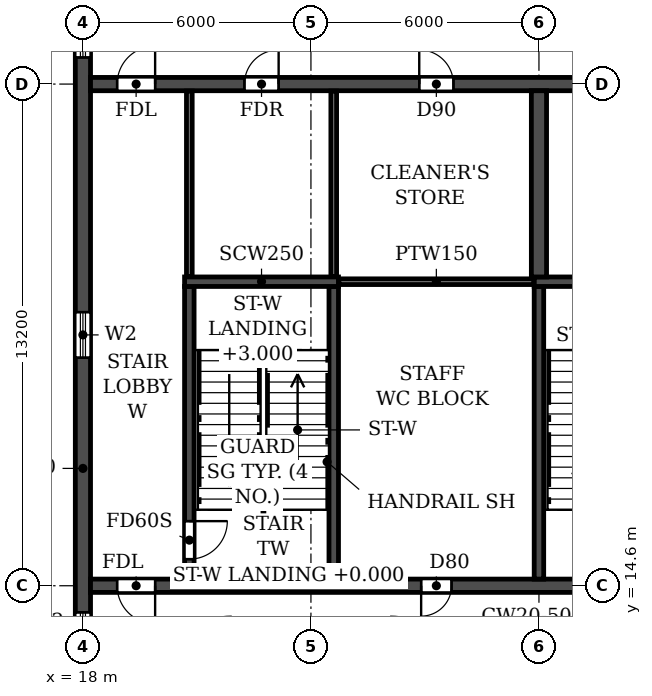
"""IFC4 building model, lengths in metres.
Left out: names, types, materials, properties, quantities, classifications, styles, units other than length and angle.
Written with IfcOpenShell. Run it as: python <this file> out.ifc"""

import sys

from ifc_helpers import new_model, si_unit, direction, frame, frame_2d, origin, place, context, subcontext, project, spatial, rectangle, extrude, element, fill, save


model = new_model("IFC4")
c1 = context("Model", 3, precision=1e-05, world=origin(), true_north=direction((0.0, 1.0)))
c2 = subcontext(c1, "Body", "Model", "MODEL_VIEW")
j1 = project(units=[si_unit("LENGTHUNIT", "METRE"), si_unit("PLANEANGLEUNIT", "RADIAN")], contexts=[c1])
p1 = place(None, origin())
s1 = spatial("IfcSite", under=j1, at=p1, CompositionType="ELEMENT")
p2 = place(p1, origin())
s2 = spatial("IfcBuilding", under=s1, at=p2, CompositionType="ELEMENT")
p3 = place(p2, frame((0.0, 0.0, 261.0)))
s3 = spatial("IfcBuildingStorey", under=s2, at=p3, CompositionType="ELEMENT", Elevation=261.0)
p4 = place(p3, frame((18.0, 4.683, 0.0), z_axis=(0.0, 0.0, 1.0), x_axis=(0.0, 1.0, 0.0)))
e1 = element("IfcWall", 1, at=p4, inside=s3, PredefinedType="SHEAR", context=c2, shape_type="SweptSolid", body=[
    extrude(rectangle(XDim=31.834, YDim=0.4, at=frame_2d((15.917, 0.0))), origin(), (0.0, 0.0, 1.0), 5.7),
])
p5 = place(p4, frame((23.817, 0.0, 0.9)))
e2 = element("IfcOpeningElement", 2, at=p5, cuts=e1, PredefinedType="OPENING", context=c2, shape_type="SweptSolid", body=[
    extrude(rectangle(XDim=1.2, YDim=1.5, at=frame_2d((0.6, 0.75))), frame((0.0, 0.21, 0.0), z_axis=(0.0, -1.0, 0.0), x_axis=(1.0, 0.0, 0.0)), (0.0, 0.0, 1.0), 0.42),
])
p6 = place(p4, frame((8.017, 0.0, 0.9)))
e3 = element("IfcOpeningElement", 3, at=p6, cuts=e1, PredefinedType="OPENING", context=c2, shape_type="SweptSolid", body=[
    extrude(rectangle(XDim=1.2, YDim=1.5, at=frame_2d((0.6, 0.75))), frame((0.0, 0.21, 0.0), z_axis=(0.0, -1.0, 0.0), x_axis=(1.0, 0.0, 0.0)), (0.0, 0.0, 1.0), 0.42),
])
p7 = place(p4, frame((27.694, 0.0, 0.6)))
e4 = element("IfcOpeningElement", 4, at=p7, cuts=e1, PredefinedType="OPENING", context=c2, shape_type="SweptSolid", body=[
    extrude(rectangle(XDim=2.2, YDim=1.8, at=frame_2d((1.1, 0.9))), frame((0.0, 0.21, 0.0), z_axis=(0.0, -1.0, 0.0), x_axis=(1.0, 0.0, 0.0)), (0.0, 0.0, 1.0), 0.42),
])
p8 = place(p4, frame((2.541, 0.0, 0.6)))
e5 = element("IfcOpeningElement", 5, at=p8, cuts=e1, PredefinedType="OPENING", context=c2, shape_type="SweptSolid", body=[
    extrude(rectangle(XDim=2.2, YDim=1.8, at=frame_2d((1.1, 0.9))), frame((0.0, 0.21, 0.0), z_axis=(0.0, -1.0, 0.0), x_axis=(1.0, 0.0, 0.0)), (0.0, 0.0, 1.0), 0.42),
])
p9 = place(p4, frame((15.917, 0.0, 0.9)))
e6 = element("IfcOpeningElement", 6, at=p9, cuts=e1, PredefinedType="OPENING", context=c2, shape_type="SweptSolid", body=[
    extrude(rectangle(XDim=1.2, YDim=1.5, at=frame_2d((0.6, 0.75))), frame((0.0, 0.21, 0.0), z_axis=(0.0, -1.0, 0.0), x_axis=(1.0, 0.0, 0.0)), (0.0, 0.0, 1.0), 0.42),
])
p10 = place(p3, frame((18.2, 14.6, 0.0), z_axis=(0.0, 0.0, 1.0), x_axis=(1.0, 0.0, 0.0)))
e7 = element("IfcWall", 7, at=p10, inside=s3, PredefinedType="SOLIDWALL", context=c2, shape_type="SweptSolid", body=[
    extrude(rectangle(XDim=65.6, YDim=0.35, at=frame_2d((32.8, 0.0))), origin(), (0.0, 0.0, 1.0), 5.7),
])
p11 = place(p10, frame((0.7, 0.0, 0.0)))
e8 = element("IfcOpeningElement", 8, at=p11, cuts=e7, PredefinedType="OPENING", context=c2, shape_type="SweptSolid", body=[
    extrude(rectangle(XDim=1.0, YDim=2.1, at=frame_2d((0.5, 1.05))), frame((0.0, 0.185, 0.0), z_axis=(0.0, -1.0, 0.0), x_axis=(1.0, 0.0, 0.0)), (0.0, 0.0, 1.0), 0.37),
])
p12 = place(p10, frame((8.7, 0.0, 0.0)))
e9 = element("IfcOpeningElement", 9, at=p12, cuts=e7, PredefinedType="OPENING", context=c2, shape_type="SweptSolid", body=[
    extrude(rectangle(XDim=0.8, YDim=2.1, at=frame_2d((0.4, 1.05))), frame((0.0, 0.185, 0.0), z_axis=(0.0, -1.0, 0.0), x_axis=(1.0, 0.0, 0.0)), (0.0, 0.0, 1.0), 0.37),
])
p13 = place(p10, frame((13.2, 0.0, 0.0)))
e10 = element("IfcOpeningElement", 10, at=p13, cuts=e7, PredefinedType="OPENING", context=c2, shape_type="SweptSolid", body=[
    extrude(rectangle(XDim=1.0, YDim=2.1, at=frame_2d((0.5, 1.05))), frame((0.0, 0.185, 0.0), z_axis=(0.0, -1.0, 0.0), x_axis=(1.0, 0.0, 0.0)), (0.0, 0.0, 1.0), 0.37),
])
p14 = place(p10, frame((25.55, 0.0, 0.0)))
e11 = element("IfcOpeningElement", 11, at=p14, cuts=e7, PredefinedType="OPENING", context=c2, shape_type="SweptSolid", body=[
    extrude(rectangle(XDim=1.5, YDim=2.1, at=frame_2d((0.75, 1.05))), frame((0.0, 0.185, 0.0), z_axis=(0.0, -1.0, 0.0), x_axis=(1.0, 0.0, 0.0)), (0.0, 0.0, 1.0), 0.37),
])
p15 = place(p10, frame((29.7, 0.0, 0.0)))
e12 = element("IfcOpeningElement", 12, at=p15, cuts=e7, PredefinedType="OPENING", context=c2, shape_type="SweptSolid", body=[
    extrude(rectangle(XDim=1.0, YDim=2.1, at=frame_2d((0.5, 1.05))), frame((0.0, 0.185, 0.0), z_axis=(0.0, -1.0, 0.0), x_axis=(1.0, 0.0, 0.0)), (0.0, 0.0, 1.0), 0.37),
])
p16 = place(p10, frame((32.3, 0.0, 0.0)))
e13 = element("IfcOpeningElement", 13, at=p16, cuts=e7, PredefinedType="OPENING", context=c2, shape_type="SweptSolid", body=[
    extrude(rectangle(XDim=1.0, YDim=2.1, at=frame_2d((0.5, 1.05))), frame((0.0, 0.185, 0.0), z_axis=(0.0, -1.0, 0.0), x_axis=(1.0, 0.0, 0.0)), (0.0, 0.0, 1.0), 0.37),
])
p17 = place(p10, frame((34.9, 0.0, 0.0)))
e14 = element("IfcOpeningElement", 14, at=p17, cuts=e7, PredefinedType="OPENING", context=c2, shape_type="SweptSolid", body=[
    extrude(rectangle(XDim=1.0, YDim=2.1, at=frame_2d((0.5, 1.05))), frame((0.0, 0.185, 0.0), z_axis=(0.0, -1.0, 0.0), x_axis=(1.0, 0.0, 0.0)), (0.0, 0.0, 1.0), 0.37),
])
p18 = place(p10, frame((38.55, 0.0, 0.0)))
e15 = element("IfcOpeningElement", 15, at=p18, cuts=e7, PredefinedType="OPENING", context=c2, shape_type="SweptSolid", body=[
    extrude(rectangle(XDim=1.5, YDim=2.1, at=frame_2d((0.75, 1.05))), frame((0.0, 0.185, 0.0), z_axis=(0.0, -1.0, 0.0), x_axis=(1.0, 0.0, 0.0)), (0.0, 0.0, 1.0), 0.37),
])
p19 = place(p10, frame((51.4, 0.0, 0.0)))
e16 = element("IfcOpeningElement", 16, at=p19, cuts=e7, PredefinedType="OPENING", context=c2, shape_type="SweptSolid", body=[
    extrude(rectangle(XDim=1.0, YDim=2.1, at=frame_2d((0.5, 1.05))), frame((0.0, 0.185, 0.0), z_axis=(0.0, -1.0, 0.0), x_axis=(1.0, 0.0, 0.0)), (0.0, 0.0, 1.0), 0.37),
])
p20 = place(p10, frame((56.1, 0.0, 0.0)))
e17 = element("IfcOpeningElement", 17, at=p20, cuts=e7, PredefinedType="OPENING", context=c2, shape_type="SweptSolid", body=[
    extrude(rectangle(XDim=0.8, YDim=2.1, at=frame_2d((0.4, 1.05))), frame((0.0, 0.185, 0.0), z_axis=(0.0, -1.0, 0.0), x_axis=(1.0, 0.0, 0.0)), (0.0, 0.0, 1.0), 0.37),
])
p21 = place(p10, frame((63.9, 0.0, 0.0)))
e18 = element("IfcOpeningElement", 18, at=p21, cuts=e7, PredefinedType="OPENING", context=c2, shape_type="SweptSolid", body=[
    extrude(rectangle(XDim=1.0, YDim=2.1, at=frame_2d((0.5, 1.05))), frame((0.0, 0.185, 0.0), z_axis=(0.0, -1.0, 0.0), x_axis=(1.0, 0.0, 0.0)), (0.0, 0.0, 1.0), 0.37),
])
p22 = place(p3, frame((18.2, 27.8, 0.0), z_axis=(0.0, 0.0, 1.0), x_axis=(1.0, 0.0, 0.0)))
e19 = element("IfcWall", 19, at=p22, inside=s3, PredefinedType="SOLIDWALL", context=c2, shape_type="SweptSolid", body=[
    extrude(rectangle(XDim=65.6, YDim=0.35, at=frame_2d((32.8, 0.0))), origin(), (0.0, 0.0, 1.0), 5.7),
])
p23 = place(p22, frame((0.7, 0.0, 0.0)))
e20 = element("IfcOpeningElement", 20, at=p23, cuts=e19, PredefinedType="OPENING", context=c2, shape_type="SweptSolid", body=[
    extrude(rectangle(XDim=1.0, YDim=2.1, at=frame_2d((0.5, 1.05))), frame((0.0, 0.185, 0.0), z_axis=(0.0, -1.0, 0.0), x_axis=(1.0, 0.0, 0.0)), (0.0, 0.0, 1.0), 0.37),
])
p24 = place(p22, frame((4.05, 0.0, 0.0)))
e21 = element("IfcOpeningElement", 21, at=p24, cuts=e19, PredefinedType="OPENING", context=c2, shape_type="SweptSolid", body=[
    extrude(rectangle(XDim=0.9, YDim=2.1, at=frame_2d((0.45, 1.05))), frame((0.0, 0.185, 0.0), z_axis=(0.0, -1.0, 0.0), x_axis=(1.0, 0.0, 0.0)), (0.0, 0.0, 1.0), 0.37),
])
p25 = place(p22, frame((8.65, 0.0, 0.0)))
e22 = element("IfcOpeningElement", 22, at=p25, cuts=e19, PredefinedType="OPENING", context=c2, shape_type="SweptSolid", body=[
    extrude(rectangle(XDim=0.9, YDim=2.1, at=frame_2d((0.45, 1.05))), frame((0.0, 0.185, 0.0), z_axis=(0.0, -1.0, 0.0), x_axis=(1.0, 0.0, 0.0)), (0.0, 0.0, 1.0), 0.37),
])
p26 = place(p22, frame((13.25, 0.0, 0.0)))
e23 = element("IfcOpeningElement", 23, at=p26, cuts=e19, PredefinedType="OPENING", context=c2, shape_type="SweptSolid", body=[
    extrude(rectangle(XDim=0.9, YDim=2.1, at=frame_2d((0.45, 1.05))), frame((0.0, 0.185, 0.0), z_axis=(0.0, -1.0, 0.0), x_axis=(1.0, 0.0, 0.0)), (0.0, 0.0, 1.0), 0.37),
])
p27 = place(p22, frame((16.4, 0.0, 0.0)))
e24 = element("IfcOpeningElement", 24, at=p27, cuts=e19, PredefinedType="OPENING", context=c2, shape_type="SweptSolid", body=[
    extrude(rectangle(XDim=1.0, YDim=2.1, at=frame_2d((0.5, 1.05))), frame((0.0, 0.185, 0.0), z_axis=(0.0, -1.0, 0.0), x_axis=(1.0, 0.0, 0.0)), (0.0, 0.0, 1.0), 0.37),
])
p28 = place(p22, frame((21.6, 0.0, 0.0)))
e25 = element("IfcOpeningElement", 25, at=p28, cuts=e19, PredefinedType="OPENING", context=c2, shape_type="SweptSolid", body=[
    extrude(rectangle(XDim=1.0, YDim=2.1, at=frame_2d((0.5, 1.05))), frame((0.0, 0.185, 0.0), z_axis=(0.0, -1.0, 0.0), x_axis=(1.0, 0.0, 0.0)), (0.0, 0.0, 1.0), 0.37),
])
p29 = place(p22, frame((29.4, 0.0, 0.0)))
e26 = element("IfcOpeningElement", 26, at=p29, cuts=e19, PredefinedType="OPENING", context=c2, shape_type="SweptSolid", body=[
    extrude(rectangle(XDim=1.0, YDim=2.1, at=frame_2d((0.5, 1.05))), frame((0.0, 0.185, 0.0), z_axis=(0.0, -1.0, 0.0), x_axis=(1.0, 0.0, 0.0)), (0.0, 0.0, 1.0), 0.37),
])
p30 = place(p22, frame((32.3, 0.0, 0.0)))
e27 = element("IfcOpeningElement", 27, at=p30, cuts=e19, PredefinedType="OPENING", context=c2, shape_type="SweptSolid", body=[
    extrude(rectangle(XDim=1.0, YDim=2.1, at=frame_2d((0.5, 1.05))), frame((0.0, 0.185, 0.0), z_axis=(0.0, -1.0, 0.0), x_axis=(1.0, 0.0, 0.0)), (0.0, 0.0, 1.0), 0.37),
])
p31 = place(p22, frame((35.2, 0.0, 0.0)))
e28 = element("IfcOpeningElement", 28, at=p31, cuts=e19, PredefinedType="OPENING", context=c2, shape_type="SweptSolid", body=[
    extrude(rectangle(XDim=1.0, YDim=2.1, at=frame_2d((0.5, 1.05))), frame((0.0, 0.185, 0.0), z_axis=(0.0, -1.0, 0.0), x_axis=(1.0, 0.0, 0.0)), (0.0, 0.0, 1.0), 0.37),
])
p32 = place(p22, frame((37.8, 0.0, 0.0)))
e29 = element("IfcOpeningElement", 29, at=p32, cuts=e19, PredefinedType="OPENING", context=c2, shape_type="SweptSolid", body=[
    extrude(rectangle(XDim=1.0, YDim=2.1, at=frame_2d((0.5, 1.05))), frame((0.0, 0.185, 0.0), z_axis=(0.0, -1.0, 0.0), x_axis=(1.0, 0.0, 0.0)), (0.0, 0.0, 1.0), 0.37),
])
p33 = place(p22, frame((41.7, 0.0, 0.0)))
e30 = element("IfcOpeningElement", 30, at=p33, cuts=e19, PredefinedType="OPENING", context=c2, shape_type="SweptSolid", body=[
    extrude(rectangle(XDim=1.0, YDim=2.1, at=frame_2d((0.5, 1.05))), frame((0.0, 0.185, 0.0), z_axis=(0.0, -1.0, 0.0), x_axis=(1.0, 0.0, 0.0)), (0.0, 0.0, 1.0), 0.37),
])
p34 = place(p22, frame((45.6, 0.0, 0.0)))
e31 = element("IfcOpeningElement", 31, at=p34, cuts=e19, PredefinedType="OPENING", context=c2, shape_type="SweptSolid", body=[
    extrude(rectangle(XDim=1.0, YDim=2.1, at=frame_2d((0.5, 1.05))), frame((0.0, 0.185, 0.0), z_axis=(0.0, -1.0, 0.0), x_axis=(1.0, 0.0, 0.0)), (0.0, 0.0, 1.0), 0.37),
])
p35 = place(p22, frame((48.2, 0.0, 0.0)))
e32 = element("IfcOpeningElement", 32, at=p35, cuts=e19, PredefinedType="OPENING", context=c2, shape_type="SweptSolid", body=[
    extrude(rectangle(XDim=1.0, YDim=2.1, at=frame_2d((0.5, 1.05))), frame((0.0, 0.185, 0.0), z_axis=(0.0, -1.0, 0.0), x_axis=(1.0, 0.0, 0.0)), (0.0, 0.0, 1.0), 0.37),
])
p36 = place(p22, frame((51.45, 0.0, 0.0)))
e33 = element("IfcOpeningElement", 33, at=p36, cuts=e19, PredefinedType="OPENING", context=c2, shape_type="SweptSolid", body=[
    extrude(rectangle(XDim=0.9, YDim=2.1, at=frame_2d((0.45, 1.05))), frame((0.0, 0.185, 0.0), z_axis=(0.0, -1.0, 0.0), x_axis=(1.0, 0.0, 0.0)), (0.0, 0.0, 1.0), 0.37),
])
p37 = place(p22, frame((56.05, 0.0, 0.0)))
e34 = element("IfcOpeningElement", 34, at=p37, cuts=e19, PredefinedType="OPENING", context=c2, shape_type="SweptSolid", body=[
    extrude(rectangle(XDim=0.9, YDim=2.1, at=frame_2d((0.45, 1.05))), frame((0.0, 0.185, 0.0), z_axis=(0.0, -1.0, 0.0), x_axis=(1.0, 0.0, 0.0)), (0.0, 0.0, 1.0), 0.37),
])
p38 = place(p22, frame((60.65, 0.0, 0.0)))
e35 = element("IfcOpeningElement", 35, at=p38, cuts=e19, PredefinedType="OPENING", context=c2, shape_type="SweptSolid", body=[
    extrude(rectangle(XDim=0.9, YDim=2.1, at=frame_2d((0.45, 1.05))), frame((0.0, 0.185, 0.0), z_axis=(0.0, -1.0, 0.0), x_axis=(1.0, 0.0, 0.0)), (0.0, 0.0, 1.0), 0.37),
])
p39 = place(p22, frame((63.9, 0.0, 0.0)))
e36 = element("IfcOpeningElement", 36, at=p39, cuts=e19, PredefinedType="OPENING", context=c2, shape_type="SweptSolid", body=[
    extrude(rectangle(XDim=1.0, YDim=2.1, at=frame_2d((0.5, 1.05))), frame((0.0, 0.185, 0.0), z_axis=(0.0, -1.0, 0.0), x_axis=(1.0, 0.0, 0.0)), (0.0, 0.0, 1.0), 0.37),
])
p40 = place(p3, frame((30.0, 22.725, 0.0), z_axis=(0.0, 0.0, 1.0), x_axis=(0.0, 1.0, 0.0)))
e37 = element("IfcWall", 37, at=p40, inside=s3, PredefinedType="SOLIDWALL", context=c2, shape_type="SweptSolid", body=[
    extrude(rectangle(XDim=4.9, YDim=0.4, at=frame_2d((2.45, 0.0))), origin(), (0.0, 0.0, 1.0), 5.7),
])
p41 = place(p3, frame((30.0, 14.775, 0.0), z_axis=(0.0, 0.0, 1.0), x_axis=(0.0, 1.0, 0.0)))
e38 = element("IfcWall", 38, at=p41, inside=s3, PredefinedType="SOLIDWALL", context=c2, shape_type="SweptSolid", body=[
    extrude(rectangle(XDim=7.7, YDim=0.25, at=frame_2d((3.85, 0.0))), origin(), (0.0, 0.0, 1.0), 5.7),
])
p42 = place(p3, frame((29.875, 22.6, 0.0), z_axis=(0.0, 0.0, 1.0), x_axis=(1.0, 0.0, 0.0)))
e39 = element("IfcWall", 39, at=p42, inside=s3, PredefinedType="SOLIDWALL", context=c2, shape_type="SweptSolid", body=[
    extrude(rectangle(XDim=4.05, YDim=0.25, at=frame_2d((2.025, 0.0))), origin(), (0.0, 0.0, 1.0), 5.7),
])
p43 = place(p3, frame((20.8, 14.775, 0.0), z_axis=(0.0, 0.0, 1.0), x_axis=(0.0, 1.0, 0.0)))
e40 = element("IfcWall", 40, at=p43, inside=s3, PredefinedType="SOLIDWALL", context=c2, shape_type="SweptSolid", body=[
    extrude(rectangle(XDim=7.7, YDim=0.25, at=frame_2d((3.85, 0.0))), origin(), (0.0, 0.0, 1.0), 5.7),
])
p44 = place(p43, frame((0.525, 0.0, 0.0)))
e41 = element("IfcOpeningElement", 41, at=p44, cuts=e40, PredefinedType="OPENING", context=c2, shape_type="SweptSolid", body=[
    extrude(rectangle(XDim=1.0, YDim=2.1, at=frame_2d((0.5, 1.05))), frame((0.0, 0.135, 0.0), z_axis=(0.0, -1.0, 0.0), x_axis=(1.0, 0.0, 0.0)), (0.0, 0.0, 1.0), 0.27),
])
p45 = place(p3, frame((24.6, 14.775, 0.0), z_axis=(0.0, 0.0, 1.0), x_axis=(0.0, 1.0, 0.0)))
e42 = element("IfcWall", 42, at=p45, inside=s3, PredefinedType="SOLIDWALL", context=c2, shape_type="SweptSolid", body=[
    extrude(rectangle(XDim=7.7, YDim=0.25, at=frame_2d((3.85, 0.0))), origin(), (0.0, 0.0, 1.0), 5.7),
])
p46 = place(p3, frame((20.675, 22.6, 0.0), z_axis=(0.0, 0.0, 1.0), x_axis=(1.0, 0.0, 0.0)))
e43 = element("IfcWall", 43, at=p46, inside=s3, PredefinedType="SOLIDWALL", context=c2, shape_type="SweptSolid", body=[
    extrude(rectangle(XDim=4.05, YDim=0.25, at=frame_2d((2.025, 0.0))), origin(), (0.0, 0.0, 1.0), 5.7),
])
p47 = place(p3, frame((24.735, 22.6, 0.0), z_axis=(0.0, 0.0, 1.0), x_axis=(1.0, 0.0, 0.0)))
e44 = element("IfcWall", 44, at=p47, inside=s3, PredefinedType="PARTITIONING", context=c2, shape_type="SweptSolid", body=[
    extrude(rectangle(XDim=5.13, YDim=0.15, at=frame_2d((2.565, 0.0))), origin(), (0.0, 0.0, 1.0), 5.7),
])
for number, where, z_axis, x_axis in (
    (45, (20.8, 22.735, 0.0), (0.0, 0.0, 1.0), (0.0, 1.0, 0.0)),
    (46, (24.6, 22.735, 0.0), (0.0, 0.0, 1.0), (0.0, 1.0, 0.0)),
):
    element("IfcWall", number, at=place(p3, frame(where, z_axis=z_axis, x_axis=x_axis)), inside=s3, PredefinedType="PARTITIONING", context=c2, shape_type="SweptSolid", body=[
        extrude(rectangle(XDim=4.88, YDim=0.15, at=frame_2d((2.44, 0.0))), origin(), (0.0, 0.0, 1.0), 5.7),
    ])
p48 = place(p5, origin())
e47 = element("IfcWindow", 47, at=p48, inside=s3, PartitioningType="SINGLE_PANEL", PredefinedType="WINDOW", context=c2, shape_type="SweptSolid", body=[
    extrude(rectangle(XDim=1.2, YDim=1.5, at=frame_2d((0.6, 0.75))), frame((0.0, 0.03, 0.0), z_axis=(0.0, -1.0, 0.0), x_axis=(1.0, 0.0, 0.0)), (0.0, 0.0, 1.0), 0.06),
])
fill(e2, e47)
p49 = place(p6, origin())
e48 = element("IfcWindow", 48, at=p49, inside=s3, PartitioningType="SINGLE_PANEL", PredefinedType="WINDOW", context=c2, shape_type="SweptSolid", body=[
    extrude(rectangle(XDim=1.2, YDim=1.5, at=frame_2d((0.6, 0.75))), frame((0.0, 0.03, 0.0), z_axis=(0.0, -1.0, 0.0), x_axis=(1.0, 0.0, 0.0)), (0.0, 0.0, 1.0), 0.06),
])
fill(e3, e48)
p50 = place(p9, origin())
e49 = element("IfcWindow", 49, at=p50, inside=s3, PartitioningType="SINGLE_PANEL", PredefinedType="WINDOW", context=c2, shape_type="SweptSolid", body=[
    extrude(rectangle(XDim=1.2, YDim=1.5, at=frame_2d((0.6, 0.75))), frame((0.0, 0.03, 0.0), z_axis=(0.0, -1.0, 0.0), x_axis=(1.0, 0.0, 0.0)), (0.0, 0.0, 1.0), 0.06),
])
fill(e6, e49)
p51 = place(p23, origin())
e50 = element("IfcDoor", 50, at=p51, inside=s3, OperationType="SINGLE_SWING_RIGHT", PredefinedType="DOOR", context=c2, shape_type="SweptSolid", body=[
    extrude(rectangle(XDim=1.0, YDim=2.1, at=frame_2d((0.5, 1.05))), frame((0.0, 0.025, 0.0), z_axis=(0.0, -1.0, 0.0), x_axis=(1.0, 0.0, 0.0)), (0.0, 0.0, 1.0), 0.05),
])
fill(e20, e50)
p52 = place(p24, origin())
e51 = element("IfcDoor", 51, at=p52, inside=s3, OperationType="SINGLE_SWING_RIGHT", PredefinedType="DOOR", context=c2, shape_type="SweptSolid", body=[
    extrude(rectangle(XDim=0.9, YDim=2.1, at=frame_2d((0.45, 1.05))), frame((0.0, 0.025, 0.0), z_axis=(0.0, -1.0, 0.0), x_axis=(1.0, 0.0, 0.0)), (0.0, 0.0, 1.0), 0.05),
])
fill(e21, e51)
p53 = place(p25, origin())
e52 = element("IfcDoor", 52, at=p53, inside=s3, OperationType="SINGLE_SWING_LEFT", PredefinedType="DOOR", context=c2, shape_type="SweptSolid", body=[
    extrude(rectangle(XDim=0.9, YDim=2.1, at=frame_2d((0.45, 1.05))), frame((0.0, 0.025, 0.0), z_axis=(0.0, -1.0, 0.0), x_axis=(1.0, 0.0, 0.0)), (0.0, 0.0, 1.0), 0.05),
])
fill(e22, e52)
p54 = place(p11, frame((1.0, 0.0, 0.0), z_axis=(0.0, 0.0, 1.0), x_axis=(-1.0, 0.0, 0.0)))
e53 = element("IfcDoor", 53, at=p54, inside=s3, OperationType="SINGLE_SWING_LEFT", PredefinedType="DOOR", context=c2, shape_type="SweptSolid", body=[
    extrude(rectangle(XDim=1.0, YDim=2.1, at=frame_2d((0.5, 1.05))), frame((0.0, 0.025, 0.0), z_axis=(0.0, -1.0, 0.0), x_axis=(1.0, 0.0, 0.0)), (0.0, 0.0, 1.0), 0.05),
])
fill(e8, e53)
p55 = place(p12, frame((0.8, 0.0, 0.0), z_axis=(0.0, 0.0, 1.0), x_axis=(-1.0, 0.0, 0.0)))
e54 = element("IfcDoor", 54, at=p55, inside=s3, OperationType="SINGLE_SWING_RIGHT", PredefinedType="DOOR", context=c2, shape_type="SweptSolid", body=[
    extrude(rectangle(XDim=0.8, YDim=2.1, at=frame_2d((0.4, 1.05))), frame((0.0, 0.025, 0.0), z_axis=(0.0, -1.0, 0.0), x_axis=(1.0, 0.0, 0.0)), (0.0, 0.0, 1.0), 0.05),
])
fill(e9, e54)
p56 = place(p44, frame((1.0, 0.0, 0.0), z_axis=(0.0, 0.0, 1.0), x_axis=(-1.0, 0.0, 0.0)))
e55 = element("IfcDoor", 55, at=p56, inside=s3, OperationType="SINGLE_SWING_LEFT", PredefinedType="DOOR", context=c2, shape_type="SweptSolid", body=[
    extrude(rectangle(XDim=1.0, YDim=2.1, at=frame_2d((0.5, 1.05))), frame((0.0, 0.025, 0.0), z_axis=(0.0, -1.0, 0.0), x_axis=(1.0, 0.0, 0.0)), (0.0, 0.0, 1.0), 0.05),
])
fill(e41, e55)
save(model, sys.argv[1])
